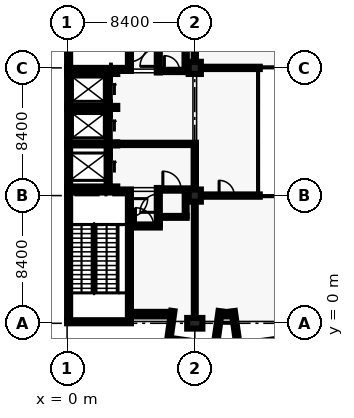
"""IFC4 building model, lengths in metres.
Left out: names, types, materials, properties, quantities, classifications, styles, units other than length and angle.
Written with IfcOpenShell. Run it as: python <this file> out.ifc"""

import sys

from ifc_helpers import new_model, si_unit, direction, frame, frame_2d, origin, origin_2d, place, context, subcontext, project, spatial, rectangle, extrude, element, fill, save


model = new_model("IFC4")
c1 = context("Model", 3, precision=1e-05, world=origin(), true_north=direction((0.0, 1.0)))
c2 = subcontext(c1, "Body", "Model", "MODEL_VIEW")
j1 = project(units=[si_unit("LENGTHUNIT", "METRE"), si_unit("PLANEANGLEUNIT", "RADIAN")], contexts=[c1])
p1 = place(None, origin())
s1 = spatial("IfcSite", under=j1, at=p1, CompositionType="ELEMENT")
p2 = place(p1, origin())
s2 = spatial("IfcBuilding", under=s1, at=p2, CompositionType="ELEMENT")
p3 = place(p2, frame((0.0, 0.0, 10.2)))
s3 = spatial("IfcBuildingStorey", under=s2, at=p3, CompositionType="ELEMENT", Elevation=10.2)
for number, where, z_axis, x_axis in (
    (1, (4.2, 0.1, 0.0), (0.0, 0.0, 1.0), (-1.0, 0.0, 0.0)),
    (2, (0.0, 8.7, 0.0), (0.0, 0.0, 1.0), (1.0, 0.0, 0.0)),
):
    element("IfcWall", number, at=place(p3, frame(where, z_axis=z_axis, x_axis=x_axis)), inside=s3, PredefinedType="SHEAR", context=c2, shape_type="SweptSolid", body=[
        extrude(rectangle(XDim=4.199, YDim=0.2, at=frame_2d((2.1, 0.0))), origin(), (0.0, 0.0, 1.0), 4.8),
    ])
p4 = place(p3, frame((0.1, 0.2, 0.0), z_axis=(0.0, 0.0, 1.0), x_axis=(0.0, 1.0, 0.0)))
e3 = element("IfcWall", 3, at=p4, inside=s3, PredefinedType="SHEAR", context=c2, shape_type="SweptSolid", body=[
    extrude(rectangle(XDim=8.4, YDim=0.2, at=frame_2d((4.2, 0.0))), origin(), (0.0, 0.0, 1.0), 4.8),
])
p5 = place(p3, frame((4.1, 8.6, 0.0), z_axis=(0.0, 0.0, 1.0), x_axis=(0.0, -1.0, 0.0)))
e4 = element("IfcWall", 4, at=p5, inside=s3, PredefinedType="SHEAR", context=c2, shape_type="SweptSolid", body=[
    extrude(rectangle(XDim=8.4, YDim=0.2, at=frame_2d((4.2, 0.0))), origin(), (0.0, 0.0, 1.0), 4.8),
])
p6 = place(p5, frame((0.4, 0.0, 0.0)))
e5 = element("IfcOpeningElement", 5, at=p6, cuts=e4, PredefinedType="OPENING", context=c2, shape_type="SweptSolid", body=[
    extrude(rectangle(XDim=1.2, YDim=2.1, at=frame_2d((0.6, 1.05))), frame((0.0, 0.11, 0.0), z_axis=(0.0, -1.0, 0.0), x_axis=(1.0, 0.0, 0.0)), (0.0, 0.0, 1.0), 0.22),
])
p7 = place(p3, frame((4.2, 16.7, 0.0), z_axis=(0.0, 0.0, 1.0), x_axis=(-1.0, 0.0, 0.0)))
e6 = element("IfcWall", 6, at=p7, inside=s3, PredefinedType="SHEAR", context=c2, shape_type="SweptSolid", body=[
    extrude(rectangle(XDim=4.199, YDim=0.2, at=frame_2d((2.1, 0.0))), origin(), (0.0, 0.0, 1.0), 4.8),
])
p8 = place(p3, frame((0.1, 16.8, 0.0), z_axis=(0.0, 0.0, 1.0), x_axis=(0.0, 1.0, 0.0)))
e7 = element("IfcWall", 7, at=p8, inside=s3, PredefinedType="SHEAR", context=c2, shape_type="SweptSolid", body=[
    extrude(rectangle(XDim=8.2, YDim=0.2, at=frame_2d((4.1, 0.0))), origin(), (0.0, 0.0, 1.0), 4.8),
])
p9 = place(p3, frame((4.1, 25.0, 0.0), z_axis=(0.0, 0.0, 1.0), x_axis=(0.0, -1.0, 0.0)))
e8 = element("IfcWall", 8, at=p9, inside=s3, PredefinedType="SHEAR", context=c2, shape_type="SweptSolid", body=[
    extrude(rectangle(XDim=8.2, YDim=0.2, at=frame_2d((4.1, 0.0))), origin(), (0.0, 0.0, 1.0), 4.8),
])
p10 = place(p9, frame((6.6, 0.0, 0.0)))
e9 = element("IfcOpeningElement", 9, at=p10, cuts=e8, PredefinedType="OPENING", context=c2, shape_type="SweptSolid", body=[
    extrude(rectangle(XDim=1.2, YDim=2.1, at=frame_2d((0.6, 1.05))), frame((0.0, 0.11, 0.0), z_axis=(0.0, -1.0, 0.0), x_axis=(1.0, 0.0, 0.0)), (0.0, 0.0, 1.0), 0.22),
])
for number, where, z_axis, x_axis in (
    (10, (2.8, 8.9, 0.0), (0.0, 0.0, 1.0), (-1.0, 0.0, 0.0)),
    (11, (0.0, 11.8, 0.0), (0.0, 0.0, 1.0), (1.0, 0.0, 0.0)),
):
    element("IfcWall", number, at=place(p3, frame(where, z_axis=z_axis, x_axis=x_axis)), inside=s3, PredefinedType="SHEAR", context=c2, shape_type="SweptSolid", body=[
        extrude(rectangle(XDim=2.8, YDim=0.2, at=frame_2d((1.4, 0.0))), origin(), (0.0, 0.0, 1.0), 4.8),
    ])
p11 = place(p3, frame((0.1, 9.0, 0.0), z_axis=(0.0, 0.0, 1.0), x_axis=(0.0, 1.0, 0.0)))
e12 = element("IfcWall", 12, at=p11, inside=s3, PredefinedType="SHEAR", context=c2, shape_type="SweptSolid", body=[
    extrude(rectangle(XDim=2.7, YDim=0.2, at=frame_2d((1.35, 0.0))), origin(), (0.0, 0.0, 1.0), 4.8),
])
p12 = place(p3, frame((2.7, 11.7, 0.0), z_axis=(0.0, 0.0, 1.0), x_axis=(0.0, -1.0, 0.0)))
e13 = element("IfcWall", 13, at=p12, inside=s3, PredefinedType="SHEAR", context=c2, shape_type="SweptSolid", body=[
    extrude(rectangle(XDim=2.7, YDim=0.2, at=frame_2d((1.35, 0.0))), origin(), (0.0, 0.0, 1.0), 4.8),
])
p13 = place(p12, frame((0.85, 0.0, 0.0)))
e14 = element("IfcOpeningElement", 14, at=p13, cuts=e13, PredefinedType="OPENING", context=c2, shape_type="SweptSolid", body=[
    extrude(rectangle(XDim=1.1, YDim=2.1, at=frame_2d((0.55, 1.05))), frame((0.0, 0.11, 0.0), z_axis=(0.0, -1.0, 0.0), x_axis=(1.0, 0.0, 0.0)), (0.0, 0.0, 1.0), 0.22),
])
p14 = place(p3, frame((0.0, 14.2, 0.0), z_axis=(0.0, 0.0, 1.0), x_axis=(1.0, 0.0, 0.0)))
e15 = element("IfcWall", 15, at=p14, inside=s3, PredefinedType="SHEAR", context=c2, shape_type="SweptSolid", body=[
    extrude(rectangle(XDim=2.8, YDim=0.2, at=frame_2d((1.4, 0.0))), origin(), (0.0, 0.0, 1.0), 4.8),
])
p15 = place(p3, frame((0.1, 11.9, 0.0), z_axis=(0.0, 0.0, 1.0), x_axis=(0.0, 1.0, 0.0)))
e16 = element("IfcWall", 16, at=p15, inside=s3, PredefinedType="SHEAR", context=c2, shape_type="SweptSolid", body=[
    extrude(rectangle(XDim=2.2, YDim=0.2, at=frame_2d((1.1, 0.0))), origin(), (0.0, 0.0, 1.0), 4.8),
])
p16 = place(p3, frame((2.7, 14.1, 0.0), z_axis=(0.0, 0.0, 1.0), x_axis=(0.0, -1.0, 0.0)))
e17 = element("IfcWall", 17, at=p16, inside=s3, PredefinedType="SHEAR", context=c2, shape_type="SweptSolid", body=[
    extrude(rectangle(XDim=2.2, YDim=0.2, at=frame_2d((1.1, 0.0))), origin(), (0.0, 0.0, 1.0), 4.8),
])
p17 = place(p16, frame((0.55, 0.0, 0.0)))
e18 = element("IfcOpeningElement", 18, at=p17, cuts=e17, PredefinedType="OPENING", context=c2, shape_type="SweptSolid", body=[
    extrude(rectangle(XDim=1.1, YDim=2.1, at=frame_2d((0.55, 1.05))), frame((0.0, 0.11, 0.0), z_axis=(0.0, -1.0, 0.0), x_axis=(1.0, 0.0, 0.0)), (0.0, 0.0, 1.0), 0.22),
])
p18 = place(p3, frame((0.0, 16.5, 0.0), z_axis=(0.0, 0.0, 1.0), x_axis=(1.0, 0.0, 0.0)))
e19 = element("IfcWall", 19, at=p18, inside=s3, PredefinedType="SHEAR", context=c2, shape_type="SweptSolid", body=[
    extrude(rectangle(XDim=2.8, YDim=0.2, at=frame_2d((1.4, 0.0))), origin(), (0.0, 0.0, 1.0), 4.8),
])
p19 = place(p3, frame((0.1, 14.3, 0.0), z_axis=(0.0, 0.0, 1.0), x_axis=(0.0, 1.0, 0.0)))
e20 = element("IfcWall", 20, at=p19, inside=s3, PredefinedType="SHEAR", context=c2, shape_type="SweptSolid", body=[
    extrude(rectangle(XDim=2.1, YDim=0.2, at=frame_2d((1.05, 0.0))), origin(), (0.0, 0.0, 1.0), 4.8),
])
p20 = place(p3, frame((2.7, 16.4, 0.0), z_axis=(0.0, 0.0, 1.0), x_axis=(0.0, -1.0, 0.0)))
e21 = element("IfcWall", 21, at=p20, inside=s3, PredefinedType="SHEAR", context=c2, shape_type="SweptSolid", body=[
    extrude(rectangle(XDim=2.1, YDim=0.2, at=frame_2d((1.05, 0.0))), origin(), (0.0, 0.0, 1.0), 4.8),
])
p21 = place(p20, frame((0.45, 0.0, 0.0)))
e22 = element("IfcOpeningElement", 22, at=p21, cuts=e21, PredefinedType="OPENING", context=c2, shape_type="SweptSolid", body=[
    extrude(rectangle(XDim=1.1, YDim=2.1, at=frame_2d((0.55, 1.05))), frame((0.0, 0.11, 0.0), z_axis=(0.0, -1.0, 0.0), x_axis=(1.0, 0.0, 0.0)), (0.0, 0.0, 1.0), 0.22),
])
p22 = place(p3, frame((8.4, 0.0, 0.0), z_axis=(0.0, 0.0, 1.0), x_axis=(1.0, 0.0, 0.0)))
e23 = element("IfcColumn", 23, at=p22, inside=s3, PredefinedType="COLUMN", context=c2, shape_type="SweptSolid", body=[
    extrude(rectangle(XDim=1.0, YDim=0.7, at=origin_2d()), origin(), (0.0, 0.0, 1.0), 4.8),
])
for number, where, z_axis, x_axis in (
    (24, (8.4, 8.4, 0.0), (0.0, 0.0, 1.0), (1.0, 0.0, 0.0)),
    (25, (8.4, 16.8, 0.0), (0.0, 0.0, 1.0), (1.0, 0.0, 0.0)),
):
    element("IfcColumn", number, at=place(p3, frame(where, z_axis=z_axis, x_axis=x_axis)), inside=s3, PredefinedType="COLUMN", context=c2, shape_type="SweptSolid", body=[
        extrude(rectangle(XDim=0.8, YDim=0.8, at=origin_2d()), origin(), (0.0, 0.0, 1.0), 4.8),
    ])
for number, where, z_axis, x_axis in (
    (26, (3.3, 8.9, 0.0), (0.0, 0.0, 1.0), (-1.0, 0.0, 0.0)),
    (27, (2.8, 11.8, 0.0), (0.0, 0.0, 1.0), (1.0, 0.0, 0.0)),
    (28, (2.8, 14.2, 0.0), (0.0, 0.0, 1.0), (1.0, 0.0, 0.0)),
    (29, (2.8, 16.5, 0.0), (0.0, 0.0, 1.0), (1.0, 0.0, 0.0)),
):
    element("IfcWall", number, at=place(p3, frame(where, z_axis=z_axis, x_axis=x_axis)), inside=s3, PredefinedType="SHEAR", context=c2, shape_type="SweptSolid", body=[
        extrude(rectangle(XDim=0.5, YDim=0.2, at=frame_2d((0.25, 0.0))), origin(), (0.0, 0.0, 1.0), 4.8),
    ])
p23 = place(p3, frame((6.956, 0.809, 0.0), z_axis=(0.0, 0.0, 1.0), x_axis=(-0.139161311926, -0.990269725511, 0.0)))
e30 = element("IfcWall", 30, at=p23, inside=s3, PredefinedType="SOLIDWALL", context=c2, shape_type="SweptSolid", body=[
    extrude(rectangle(XDim=1.8, YDim=0.215, at=frame_2d((0.9, 0.0))), origin(), (0.0, 0.0, 1.0), 4.5),
])
for number, where, z_axis, x_axis in (
    (31, (10.069, 0.795, 0.0), (0.0, 0.0, 1.0), (-0.139, -0.99, 0.0)),
    (32, (10.931, 0.795, 0.0), (0.0, 0.0, 1.0), (0.139, -0.99, 0.0)),
):
    element("IfcWall", number, at=place(p3, frame(where, z_axis=z_axis, x_axis=x_axis)), inside=s3, PredefinedType="SOLIDWALL", context=c2, shape_type="SweptSolid", body=[
        extrude(rectangle(XDim=2.219, YDim=0.215, at=frame_2d((1.11, 0.0))), origin(), (0.0, 0.0, 1.0), 4.5),
    ])
p24 = place(p3, frame((6.818, 0.6, 0.0), z_axis=(0.0, 0.0, 1.0), x_axis=(-1.0, 0.0, 0.0)))
e33 = element("IfcWall", 33, at=p24, inside=s3, PredefinedType="SOLIDWALL", context=c2, shape_type="SweptSolid", body=[
    extrude(rectangle(XDim=2.618, YDim=0.3, at=frame_2d((1.309, 0.0))), origin(), (0.0, 0.0, 1.0), 4.5),
])
p25 = place(p24, frame((0.559, 0.0, 0.9)))
e34 = element("IfcOpeningElement", 34, at=p25, cuts=e33, PredefinedType="OPENING", context=c2, shape_type="SweptSolid", body=[
    extrude(rectangle(XDim=1.2, YDim=1.5, at=frame_2d((0.6, 0.75))), frame((0.0, 0.16, 0.0), z_axis=(0.0, -1.0, 0.0), x_axis=(1.0, 0.0, 0.0)), (0.0, 0.0, 1.0), 0.32),
])
p26 = place(p3, frame((10.85, 0.6, 0.0), z_axis=(0.0, 0.0, 1.0), x_axis=(-1.0, 0.0, 0.0)))
e35 = element("IfcWall", 35, at=p26, inside=s3, PredefinedType="SOLIDWALL", context=c2, shape_type="SweptSolid", body=[
    extrude(rectangle(XDim=0.699, YDim=0.3, at=frame_2d((0.35, 0.0))), origin(), (0.0, 0.0, 1.0), 4.5),
])
p27 = place(p3, frame((4.2, 6.4, 0.0), z_axis=(0.0, 0.0, 1.0), x_axis=(1.0, 0.0, 0.0)))
e36 = element("IfcWall", 36, at=p27, inside=s3, PredefinedType="SOLIDWALL", context=c2, shape_type="SweptSolid", body=[
    extrude(rectangle(XDim=1.9, YDim=0.2, at=frame_2d((0.95, 0.0))), origin(), (0.0, 0.0, 1.0), 4.5),
])
p28 = place(p27, frame((0.3, 0.0, 0.0)))
e37 = element("IfcOpeningElement", 37, at=p28, cuts=e36, PredefinedType="OPENING", context=c2, shape_type="SweptSolid", body=[
    extrude(rectangle(XDim=1.2, YDim=2.1, at=frame_2d((0.6, 1.05))), frame((0.0, 0.11, 0.0), z_axis=(0.0, -1.0, 0.0), x_axis=(1.0, 0.0, 0.0)), (0.0, 0.0, 1.0), 0.22),
])
p29 = place(p3, frame((6.0, 6.5, 0.0), z_axis=(0.0, 0.0, 1.0), x_axis=(0.0, 1.0, 0.0)))
e38 = element("IfcWall", 38, at=p29, inside=s3, PredefinedType="SOLIDWALL", context=c2, shape_type="SweptSolid", body=[
    extrude(rectangle(XDim=2.4, YDim=0.2, at=frame_2d((1.2, 0.0))), origin(), (0.0, 0.0, 1.0), 4.0),
])
p30 = place(p29, frame((0.8, 0.0, 0.0)))
e39 = element("IfcOpeningElement", 39, at=p30, cuts=e38, PredefinedType="OPENING", context=c2, shape_type="SweptSolid", body=[
    extrude(rectangle(XDim=1.2, YDim=2.1, at=frame_2d((0.6, 1.05))), frame((0.0, 0.11, 0.0), z_axis=(0.0, -1.0, 0.0), x_axis=(1.0, 0.0, 0.0)), (0.0, 0.0, 1.0), 0.22),
])
p31 = place(p3, frame((6.0, 16.5, 0.0), z_axis=(0.0, 0.0, 1.0), x_axis=(0.0, 1.0, 0.0)))
e40 = element("IfcWall", 40, at=p31, inside=s3, PredefinedType="SOLIDWALL", context=c2, shape_type="SweptSolid", body=[
    extrude(rectangle(XDim=2.4, YDim=0.2, at=frame_2d((1.2, 0.0))), origin(), (0.0, 0.0, 1.0), 4.0),
])
p32 = place(p31, frame((0.4, 0.0, 0.0)))
e41 = element("IfcOpeningElement", 41, at=p32, cuts=e40, PredefinedType="OPENING", context=c2, shape_type="SweptSolid", body=[
    extrude(rectangle(XDim=1.2, YDim=2.1, at=frame_2d((0.6, 1.05))), frame((0.0, 0.11, 0.0), z_axis=(0.0, -1.0, 0.0), x_axis=(1.0, 0.0, 0.0)), (0.0, 0.0, 1.0), 0.22),
])
p33 = place(p3, frame((8.325, 8.4, 0.0), z_axis=(0.0, 0.0, 1.0), x_axis=(1.0, 0.0, 0.0)))
e42 = element("IfcWall", 42, at=p33, inside=s3, PredefinedType="PARTITIONING", context=c2, shape_type="SweptSolid", body=[
    extrude(rectangle(XDim=4.35, YDim=0.15, at=frame_2d((2.175, 0.0))), origin(), (0.0, 0.0, 1.0), 3.8),
])
p34 = place(p33, frame((1.675, 0.0, 0.0)))
e43 = element("IfcOpeningElement", 43, at=p34, cuts=e42, PredefinedType="OPENING", context=c2, shape_type="SweptSolid", body=[
    extrude(rectangle(XDim=1.0, YDim=2.1, at=frame_2d((0.5, 1.05))), frame((0.0, 0.085, 0.0), z_axis=(0.0, -1.0, 0.0), x_axis=(1.0, 0.0, 0.0)), (0.0, 0.0, 1.0), 0.17),
])
p35 = place(p3, frame((6.1, 16.6, 0.0), z_axis=(0.0, 0.0, 1.0), x_axis=(1.0, 0.0, 0.0)))
e44 = element("IfcWall", 44, at=p35, inside=s3, PredefinedType="PARTITIONING", context=c2, shape_type="SweptSolid", body=[
    extrude(rectangle(XDim=1.775, YDim=0.15, at=frame_2d((0.887, 0.0))), origin(), (0.0, 0.0, 1.0), 4.0),
])
p36 = place(p35, frame((0.3, 0.0, 0.0)))
e45 = element("IfcOpeningElement", 45, at=p36, cuts=e44, PredefinedType="OPENING", context=c2, shape_type="SweptSolid", body=[
    extrude(rectangle(XDim=1.0, YDim=2.1, at=frame_2d((0.5, 1.05))), frame((0.0, 0.085, 0.0), z_axis=(0.0, -1.0, 0.0), x_axis=(1.0, 0.0, 0.0)), (0.0, 0.0, 1.0), 0.17),
])
p37 = place(p3, frame((8.325, 16.8, 0.0), z_axis=(0.0, 0.0, 1.0), x_axis=(1.0, 0.0, 0.0)))
e46 = element("IfcWall", 46, at=p37, inside=s3, PredefinedType="PARTITIONING", context=c2, shape_type="SweptSolid", body=[
    extrude(rectangle(XDim=4.35, YDim=0.15, at=frame_2d((2.175, 0.0))), origin(), (0.0, 0.0, 1.0), 3.8),
])
p38 = place(p3, frame((6.1, 8.8, 0.0), z_axis=(0.0, 0.0, 1.0), x_axis=(1.0, 0.0, 0.0)))
e47 = element("IfcWall", 47, at=p38, inside=s3, PredefinedType="SOLIDWALL", context=c2, shape_type="SweptSolid", body=[
    extrude(rectangle(XDim=2.375, YDim=0.15, at=frame_2d((1.188, 0.0))), origin(), (0.0, 0.0, 1.0), 3.8),
])
p39 = place(p38, frame((0.2, 0.0, 0.0)))
e48 = element("IfcOpeningElement", 48, at=p39, cuts=e47, PredefinedType="OPENING", context=c2, shape_type="SweptSolid", body=[
    extrude(rectangle(XDim=1.2, YDim=2.1, at=frame_2d((0.6, 1.05))), frame((0.0, 0.085, 0.0), z_axis=(0.0, -1.0, 0.0), x_axis=(1.0, 0.0, 0.0)), (0.0, 0.0, 1.0), 0.17),
])
p40 = place(p3, frame((3.3, 11.8, 0.0), z_axis=(0.0, 0.0, 1.0), x_axis=(1.0, 0.0, 0.0)))
e49 = element("IfcWall", 49, at=p40, inside=s3, PredefinedType="SOLIDWALL", context=c2, shape_type="SweptSolid", body=[
    extrude(rectangle(XDim=5.175, YDim=0.15, at=frame_2d((2.587, 0.0))), origin(), (0.0, 0.0, 1.0), 3.8),
])
p41 = place(p3, frame((7.875, 16.6, 0.0), z_axis=(0.0, 0.0, 1.0), x_axis=(1.0, 0.0, 0.0)))
e50 = element("IfcWall", 50, at=p41, inside=s3, PredefinedType="SOLIDWALL", context=c2, shape_type="SweptSolid", body=[
    extrude(rectangle(XDim=0.6, YDim=0.15, at=frame_2d((0.3, 0.0))), origin(), (0.0, 0.0, 1.0), 3.8),
])
p42 = place(p3, frame((8.4, 8.475, 0.0), z_axis=(0.0, 0.0, 1.0), x_axis=(0.0, 1.0, 0.0)))
e51 = element("IfcWall", 51, at=p42, inside=s3, PredefinedType="PARTITIONING", context=c2, shape_type="SweptSolid", body=[
    extrude(rectangle(XDim=0.25, YDim=0.15, at=frame_2d((0.125, 0.0))), origin(), (0.0, 0.0, 1.0), 3.8),
])
p43 = place(p3, frame((8.4, 8.875, 0.0), z_axis=(0.0, 0.0, 1.0), x_axis=(0.0, 1.0, 0.0)))
e52 = element("IfcWall", 52, at=p43, inside=s3, PredefinedType="SOLIDWALL", context=c2, shape_type="SweptSolid", body=[
    extrude(rectangle(XDim=2.85, YDim=0.15, at=frame_2d((1.425, 0.0))), origin(), (0.0, 0.0, 1.0), 3.8),
])
p44 = place(p3, frame((7.8, 16.675, 0.0), z_axis=(0.0, 0.0, 1.0), x_axis=(0.0, 1.0, 0.0)))
e53 = element("IfcWall", 53, at=p44, inside=s3, PredefinedType="SOLIDWALL", context=c2, shape_type="SweptSolid", body=[
    extrude(rectangle(XDim=1.65, YDim=0.15, at=frame_2d((0.825, 0.0))), origin(), (0.0, 0.0, 1.0), 4.0),
])
p45 = place(p3, frame((8.4, 16.875, 0.0), z_axis=(0.0, 0.0, 1.0), x_axis=(0.0, 1.0, 0.0)))
e54 = element("IfcWall", 54, at=p45, inside=s3, PredefinedType="SOLIDWALL", context=c2, shape_type="SweptSolid", body=[
    extrude(rectangle(XDim=7.575, YDim=0.15, at=frame_2d((3.788, 0.0))), origin(), (0.0, 0.0, 1.0), 3.8),
])
p46 = place(p3, frame((6.1, 7.0, 0.0), z_axis=(0.0, 0.0, 1.0), x_axis=(1.0, 0.0, 0.0)))
e55 = element("IfcWall", 55, at=p46, inside=s3, PredefinedType="PARTITIONING", context=c2, shape_type="SweptSolid", body=[
    extrude(rectangle(XDim=1.762, YDim=0.125, at=frame_2d((0.881, 0.0))), origin(), (0.0, 0.0, 1.0), 4.5),
])
p47 = place(p3, frame((7.8, 7.062, 0.0), z_axis=(0.0, 0.0, 1.0), x_axis=(0.0, 1.0, 0.0)))
e56 = element("IfcWall", 56, at=p47, inside=s3, PredefinedType="PARTITIONING", context=c2, shape_type="SweptSolid", body=[
    extrude(rectangle(XDim=1.663, YDim=0.125, at=frame_2d((0.831, 0.0))), origin(), (0.0, 0.0, 1.0), 4.0),
])
p48 = place(p3, frame((8.4, 0.75, 0.0), z_axis=(0.0, 0.0, 1.0), x_axis=(0.0, 1.0, 0.0)))
e57 = element("IfcWall", 57, at=p48, inside=s3, PredefinedType="PARTITIONING", context=c2, shape_type="SweptSolid", body=[
    extrude(rectangle(XDim=7.575, YDim=0.125, at=frame_2d((3.788, 0.0))), origin(), (0.0, 0.0, 1.0), 3.8),
])
p49 = place(p25, origin())
e58 = element("IfcWindow", 58, at=p49, inside=s3, PartitioningType="SINGLE_PANEL", PredefinedType="WINDOW", context=c2, shape_type="SweptSolid", body=[
    extrude(rectangle(XDim=1.2, YDim=1.5, at=frame_2d((0.6, 0.75))), frame((0.0, 0.03, 0.0), z_axis=(0.0, -1.0, 0.0), x_axis=(1.0, 0.0, 0.0)), (0.0, 0.0, 1.0), 0.06),
])
fill(e34, e58)
p50 = place(p13, origin())
e59 = element("IfcDoor", 59, at=p50, inside=s3, OperationType="SLIDING_TO_LEFT", PredefinedType="DOOR", context=c2, shape_type="SweptSolid", body=[
    extrude(rectangle(XDim=1.1, YDim=2.1, at=frame_2d((0.55, 1.05))), frame((0.0, 0.025, 0.0), z_axis=(0.0, -1.0, 0.0), x_axis=(1.0, 0.0, 0.0)), (0.0, 0.0, 1.0), 0.05),
])
fill(e14, e59)
p51 = place(p17, origin())
e60 = element("IfcDoor", 60, at=p51, inside=s3, OperationType="SLIDING_TO_LEFT", PredefinedType="DOOR", context=c2, shape_type="SweptSolid", body=[
    extrude(rectangle(XDim=1.1, YDim=2.1, at=frame_2d((0.55, 1.05))), frame((0.0, 0.025, 0.0), z_axis=(0.0, -1.0, 0.0), x_axis=(1.0, 0.0, 0.0)), (0.0, 0.0, 1.0), 0.05),
])
fill(e18, e60)
p52 = place(p21, origin())
e61 = element("IfcDoor", 61, at=p52, inside=s3, OperationType="SLIDING_TO_LEFT", PredefinedType="DOOR", context=c2, shape_type="SweptSolid", body=[
    extrude(rectangle(XDim=1.1, YDim=2.1, at=frame_2d((0.55, 1.05))), frame((0.0, 0.025, 0.0), z_axis=(0.0, -1.0, 0.0), x_axis=(1.0, 0.0, 0.0)), (0.0, 0.0, 1.0), 0.05),
])
fill(e22, e61)
p53 = place(p6, origin())
e62 = element("IfcDoor", 62, at=p53, inside=s3, OperationType="SINGLE_SWING_RIGHT", PredefinedType="DOOR", context=c2, shape_type="SweptSolid", body=[
    extrude(rectangle(XDim=1.2, YDim=2.1, at=frame_2d((0.6, 1.05))), frame((0.0, 0.025, 0.0), z_axis=(0.0, -1.0, 0.0), x_axis=(1.0, 0.0, 0.0)), (0.0, 0.0, 1.0), 0.05),
])
fill(e5, e62)
p54 = place(p10, origin())
e63 = element("IfcDoor", 63, at=p54, inside=s3, OperationType="SINGLE_SWING_RIGHT", PredefinedType="DOOR", context=c2, shape_type="SweptSolid", body=[
    extrude(rectangle(XDim=1.2, YDim=2.1, at=frame_2d((0.6, 1.05))), frame((0.0, 0.025, 0.0), z_axis=(0.0, -1.0, 0.0), x_axis=(1.0, 0.0, 0.0)), (0.0, 0.0, 1.0), 0.05),
])
fill(e9, e63)
p55 = place(p28, origin())
e64 = element("IfcDoor", 64, at=p55, inside=s3, OperationType="SINGLE_SWING_LEFT", PredefinedType="DOOR", context=c2, shape_type="SweptSolid", body=[
    extrude(rectangle(XDim=1.2, YDim=2.1, at=frame_2d((0.6, 1.05))), frame((0.0, 0.025, 0.0), z_axis=(0.0, -1.0, 0.0), x_axis=(1.0, 0.0, 0.0)), (0.0, 0.0, 1.0), 0.05),
])
fill(e37, e64)
p56 = place(p30, origin())
e65 = element("IfcDoor", 65, at=p56, inside=s3, OperationType="SINGLE_SWING_RIGHT", PredefinedType="DOOR", context=c2, shape_type="SweptSolid", body=[
    extrude(rectangle(XDim=1.2, YDim=2.1, at=frame_2d((0.6, 1.05))), frame((0.0, 0.025, 0.0), z_axis=(0.0, -1.0, 0.0), x_axis=(1.0, 0.0, 0.0)), (0.0, 0.0, 1.0), 0.05),
])
fill(e39, e65)
p57 = place(p32, origin())
e66 = element("IfcDoor", 66, at=p57, inside=s3, OperationType="SINGLE_SWING_RIGHT", PredefinedType="DOOR", context=c2, shape_type="SweptSolid", body=[
    extrude(rectangle(XDim=1.2, YDim=2.1, at=frame_2d((0.6, 1.05))), frame((0.0, 0.025, 0.0), z_axis=(0.0, -1.0, 0.0), x_axis=(1.0, 0.0, 0.0)), (0.0, 0.0, 1.0), 0.05),
])
fill(e41, e66)
p58 = place(p39, origin())
e67 = element("IfcDoor", 67, at=p58, inside=s3, OperationType="SINGLE_SWING_RIGHT", PredefinedType="DOOR", context=c2, shape_type="SweptSolid", body=[
    extrude(rectangle(XDim=1.2, YDim=2.1, at=frame_2d((0.6, 1.05))), frame((0.0, 0.025, 0.0), z_axis=(0.0, -1.0, 0.0), x_axis=(1.0, 0.0, 0.0)), (0.0, 0.0, 1.0), 0.05),
])
fill(e48, e67)
p59 = place(p36, origin())
e68 = element("IfcDoor", 68, at=p59, inside=s3, OperationType="SINGLE_SWING_RIGHT", PredefinedType="DOOR", context=c2, shape_type="SweptSolid", body=[
    extrude(rectangle(XDim=1.0, YDim=2.1, at=frame_2d((0.5, 1.05))), frame((0.0, 0.025, 0.0), z_axis=(0.0, -1.0, 0.0), x_axis=(1.0, 0.0, 0.0)), (0.0, 0.0, 1.0), 0.05),
])
fill(e45, e68)
p60 = place(p34, origin())
e69 = element("IfcDoor", 69, at=p60, inside=s3, OperationType="SINGLE_SWING_RIGHT", PredefinedType="DOOR", context=c2, shape_type="SweptSolid", body=[
    extrude(rectangle(XDim=1.0, YDim=2.1, at=frame_2d((0.5, 1.05))), frame((0.0, 0.025, 0.0), z_axis=(0.0, -1.0, 0.0), x_axis=(1.0, 0.0, 0.0)), (0.0, 0.0, 1.0), 0.05),
])
fill(e43, e69)
save(model, sys.argv[1])
